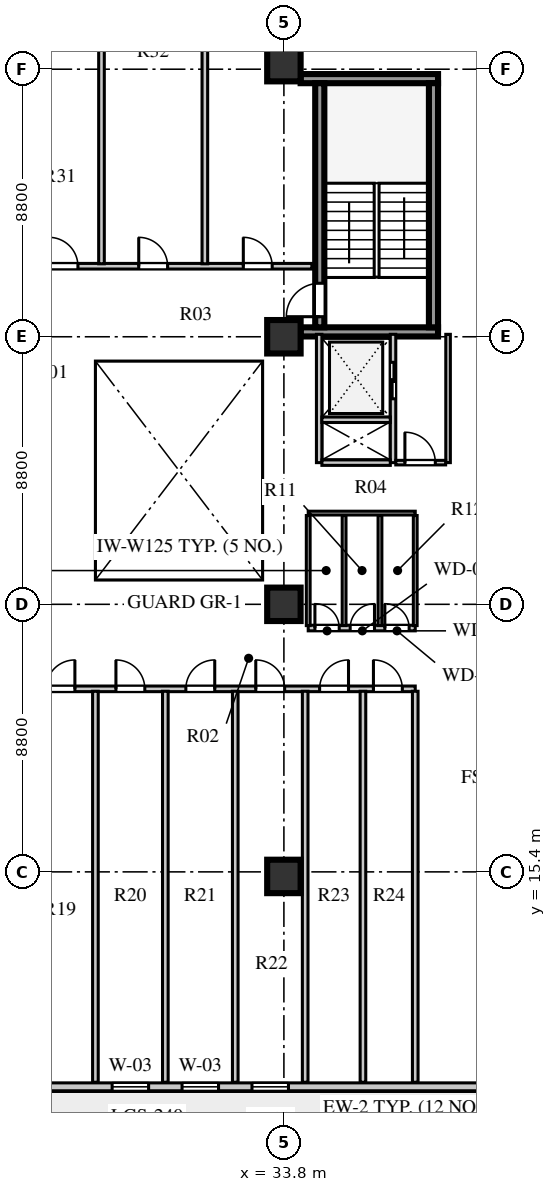
"""IFC4 building model, lengths in metres.
Left out: names, types, materials, properties, quantities, classifications, styles, units other than length and angle.
Written with IfcOpenShell. Run it as: python <this file> out.ifc"""

import sys

from ifc_helpers import new_model, si_unit, direction, frame, frame_2d, origin, origin_2d, place, context, subcontext, project, spatial, rectangle, extrude, element, fill, save


model = new_model("IFC4")
c1 = context("Model", 3, precision=1e-05, world=origin(), true_north=direction((0.0, 1.0)))
c2 = subcontext(c1, "Body", "Model", "MODEL_VIEW")
j1 = project(units=[si_unit("LENGTHUNIT", "METRE"), si_unit("PLANEANGLEUNIT", "RADIAN")], contexts=[c1])
p1 = place(None, origin())
s1 = spatial("IfcSite", under=j1, at=p1, CompositionType="ELEMENT")
p2 = place(p1, origin())
s2 = spatial("IfcBuilding", under=s1, at=p2, CompositionType="ELEMENT")
p3 = place(p2, frame((0.0, 0.0, 82.0)))
s3 = spatial("IfcBuildingStorey", under=s2, at=p3, CompositionType="ELEMENT", Elevation=82.0)
for number, where, z_axis, x_axis in (
    (1, (34.35, 33.16, 0.0), (0.0, 0.0, 1.0), (1.0, 0.0, 0.0)),
    (2, (34.35, 41.49, 0.0), (0.0, 0.0, 1.0), (1.0, 0.0, 0.0)),
):
    element("IfcWall", number, at=place(p3, frame(where, z_axis=z_axis, x_axis=x_axis)), inside=s3, PredefinedType="SHEAR", context=c2, shape_type="SweptSolid", body=[
        extrude(rectangle(XDim=4.52, YDim=0.3, at=frame_2d((2.26, 0.0))), origin(), (0.0, 0.0, 1.0), 3.74),
    ])
p4 = place(p3, frame((34.98, 33.31, 0.0), z_axis=(0.0, 0.0, 1.0), x_axis=(0.0, 1.0, 0.0)))
e3 = element("IfcWall", 3, at=p4, inside=s3, PredefinedType="SHEAR", context=c2, shape_type="SweptSolid", body=[
    extrude(rectangle(XDim=8.03, YDim=0.3, at=frame_2d((4.015, 0.0))), origin(), (0.0, 0.0, 1.0), 3.74),
])
p5 = place(p4, frame((0.35, 0.0, 0.0)))
e4 = element("IfcOpeningElement", 4, at=p5, cuts=e3, PredefinedType="OPENING", context=c2, shape_type="SweptSolid", body=[
    extrude(rectangle(XDim=1.1, YDim=2.1, at=frame_2d((0.55, 1.05))), frame((0.0, 0.16, 0.0), z_axis=(0.0, -1.0, 0.0), x_axis=(1.0, 0.0, 0.0)), (0.0, 0.0, 1.0), 0.32),
])
p6 = place(p3, frame((38.72, 33.31, 0.0), z_axis=(0.0, 0.0, 1.0), x_axis=(0.0, 1.0, 0.0)))
e5 = element("IfcWall", 5, at=p6, inside=s3, PredefinedType="SHEAR", context=c2, shape_type="SweptSolid", body=[
    extrude(rectangle(XDim=8.03, YDim=0.3, at=frame_2d((4.015, 0.0))), origin(), (0.0, 0.0, 1.0), 3.74),
])
for number, where, z_axis, x_axis in (
    (6, (33.8, 15.25, 0.0), (0.0, 0.0, 1.0), (1.0, 0.0, 0.0)),
    (7, (33.8, 24.2, 0.0), (0.0, 0.0, 1.0), (1.0, 0.0, 0.0)),
    (8, (33.8, 33.0, 0.0), (0.0, 0.0, 1.0), (1.0, 0.0, 0.0)),
    (9, (33.8, 41.95, 0.0), (0.0, 0.0, 1.0), (1.0, 0.0, 0.0)),
):
    element("IfcColumn", number, at=place(p3, frame(where, z_axis=z_axis, x_axis=x_axis)), inside=s3, PredefinedType="COLUMN", context=c2, shape_type="SweptSolid", body=[
        extrude(rectangle(XDim=1.1, YDim=1.1, at=origin_2d()), origin(), (0.0, 0.0, 1.0), 3.74),
    ])
p7 = place(p3, frame((12.0, 8.33, 0.0), z_axis=(0.0, 0.0, 1.0), x_axis=(1.0, 0.0, 0.0)))
e10 = element("IfcWall", 10, at=p7, inside=s3, PredefinedType="SOLIDWALL", context=c2, shape_type="SweptSolid", body=[
    extrude(rectangle(XDim=34.6, YDim=0.26, at=frame_2d((17.3, 0.0))), origin(), (0.0, 0.0, 1.0), 3.74),
])
p8 = place(p7, frame((0.95, 0.0, 0.0)))
e11 = element("IfcOpeningElement", 11, at=p8, cuts=e10, PredefinedType="OPENING", context=c2, shape_type="SweptSolid", body=[
    extrude(rectangle(XDim=1.0, YDim=2.05, at=frame_2d((0.5, 1.025))), frame((0.0, 0.14, 0.0), z_axis=(0.0, -1.0, 0.0), x_axis=(1.0, 0.0, 0.0)), (0.0, 0.0, 1.0), 0.28),
])
p9 = place(p7, frame((7.88, 0.0, 0.8)))
e12 = element("IfcOpeningElement", 12, at=p9, cuts=e10, PredefinedType="OPENING", context=c2, shape_type="SweptSolid", body=[
    extrude(rectangle(XDim=1.5, YDim=2.0, at=frame_2d((0.75, 1.0))), frame((0.0, 0.14, 0.0), z_axis=(0.0, -1.0, 0.0), x_axis=(1.0, 0.0, 0.0)), (0.0, 0.0, 1.0), 0.28),
])
p10 = place(p7, frame((16.15, 0.0, 0.8)))
e13 = element("IfcOpeningElement", 13, at=p10, cuts=e10, PredefinedType="OPENING", context=c2, shape_type="SweptSolid", body=[
    extrude(rectangle(XDim=1.2, YDim=1.75, at=frame_2d((0.6, 0.875))), frame((0.0, 0.14, 0.0), z_axis=(0.0, -1.0, 0.0), x_axis=(1.0, 0.0, 0.0)), (0.0, 0.0, 1.0), 0.28),
])
p11 = place(p7, frame((18.45, 0.0, 0.8)))
e14 = element("IfcOpeningElement", 14, at=p11, cuts=e10, PredefinedType="OPENING", context=c2, shape_type="SweptSolid", body=[
    extrude(rectangle(XDim=1.2, YDim=1.75, at=frame_2d((0.6, 0.875))), frame((0.0, 0.14, 0.0), z_axis=(0.0, -1.0, 0.0), x_axis=(1.0, 0.0, 0.0)), (0.0, 0.0, 1.0), 0.28),
])
p12 = place(p7, frame((20.75, 0.0, 0.8)))
e15 = element("IfcOpeningElement", 15, at=p12, cuts=e10, PredefinedType="OPENING", context=c2, shape_type="SweptSolid", body=[
    extrude(rectangle(XDim=1.2, YDim=1.75, at=frame_2d((0.6, 0.875))), frame((0.0, 0.14, 0.0), z_axis=(0.0, -1.0, 0.0), x_axis=(1.0, 0.0, 0.0)), (0.0, 0.0, 1.0), 0.28),
])
p13 = place(p7, frame((29.63, 0.0, 0.8)))
e16 = element("IfcOpeningElement", 16, at=p13, cuts=e10, PredefinedType="OPENING", context=c2, shape_type="SweptSolid", body=[
    extrude(rectangle(XDim=1.35, YDim=1.9, at=frame_2d((0.675, 0.95))), frame((0.0, 0.14, 0.0), z_axis=(0.0, -1.0, 0.0), x_axis=(1.0, 0.0, 0.0)), (0.0, 0.0, 1.0), 0.28),
])
p14 = place(p3, frame((34.96, 28.86, 0.0), z_axis=(0.0, 0.0, 1.0), x_axis=(0.0, 1.0, 0.0)))
e17 = element("IfcWall", 17, at=p14, inside=s3, PredefinedType="SOLIDWALL", context=c2, shape_type="SweptSolid", body=[
    extrude(rectangle(XDim=4.22, YDim=0.18, at=frame_2d((2.11, 0.0))), origin(), (0.0, 0.0, 1.0), 3.74),
])
p15 = place(p3, frame((37.39, 28.86, 0.0), z_axis=(0.0, 0.0, 1.0), x_axis=(0.0, 1.0, 0.0)))
e18 = element("IfcWall", 18, at=p15, inside=s3, PredefinedType="SOLIDWALL", context=c2, shape_type="SweptSolid", body=[
    extrude(rectangle(XDim=4.22, YDim=0.18, at=frame_2d((2.11, 0.0))), origin(), (0.0, 0.0, 1.0), 3.74),
])
p16 = place(p15, frame((2.1, 0.0, 0.0)))
e19 = element("IfcOpeningElement", 19, at=p16, cuts=e18, PredefinedType="OPENING", context=c2, shape_type="SweptSolid", body=[
    extrude(rectangle(XDim=1.2, YDim=2.12, at=frame_2d((0.6, 1.06))), frame((0.0, 0.1, 0.0), z_axis=(0.0, -1.0, 0.0), x_axis=(1.0, 0.0, 0.0)), (0.0, 0.0, 1.0), 0.2),
])
for number, where, z_axis, x_axis in (
    (20, (35.05, 28.86, 0.0), (0.0, 0.0, 1.0), (1.0, 0.0, 0.0)),
    (21, (35.05, 30.27, 0.0), (0.0, 0.0, 1.0), (1.0, 0.0, 0.0)),
):
    element("IfcWall", number, at=place(p3, frame(where, z_axis=z_axis, x_axis=x_axis)), inside=s3, PredefinedType="SOLIDWALL", context=c2, shape_type="SweptSolid", body=[
        extrude(rectangle(XDim=2.25, YDim=0.18, at=frame_2d((1.125, 0.0))), origin(), (0.0, 0.0, 1.0), 3.74),
    ])
p17 = place(p3, frame((39.2, 28.86, 0.0), z_axis=(0.0, 0.0, 1.0), x_axis=(0.0, 1.0, 0.0)))
e22 = element("IfcWall", 22, at=p17, inside=s3, PredefinedType="PARTITIONING", context=c2, shape_type="SweptSolid", body=[
    extrude(rectangle(XDim=4.22, YDim=0.15, at=frame_2d((2.11, 0.0))), origin(), (0.0, 0.0, 1.0), 3.74),
])
p18 = place(p3, frame((37.48, 28.86, 0.0), z_axis=(0.0, 0.0, 1.0), x_axis=(1.0, 0.0, 0.0)))
e23 = element("IfcWall", 23, at=p18, inside=s3, PredefinedType="PARTITIONING", context=c2, shape_type="SweptSolid", body=[
    extrude(rectangle(XDim=1.64, YDim=0.15, at=frame_2d((0.82, 0.0))), origin(), (0.0, 0.0, 1.0), 3.74),
])
p19 = place(p18, frame((0.3, 0.0, 0.0)))
e24 = element("IfcOpeningElement", 24, at=p19, cuts=e23, PredefinedType="OPENING", context=c2, shape_type="SweptSolid", body=[
    extrude(rectangle(XDim=1.0, YDim=2.1, at=frame_2d((0.5, 1.05))), frame((0.0, 0.085, 0.0), z_axis=(0.0, -1.0, 0.0), x_axis=(1.0, 0.0, 0.0)), (0.0, 0.0, 1.0), 0.17),
])
p20 = place(p3, frame((25.25, 21.42, 0.0), z_axis=(0.0, 0.0, 1.0), x_axis=(1.0, 0.0, 0.0)))
e25 = element("IfcWall", 25, at=p20, inside=s3, PredefinedType="SOLIDWALL", context=c2, shape_type="SweptSolid", body=[
    extrude(rectangle(XDim=12.87, YDim=0.185, at=frame_2d((6.435, 0.0))), origin(), (0.0, 0.0, 1.0), 3.34),
])
p21 = place(p20, frame((0.725, 0.0, 0.0)))
e26 = element("IfcOpeningElement", 26, at=p21, cuts=e25, PredefinedType="OPENING", context=c2, shape_type="SweptSolid", body=[
    extrude(rectangle(XDim=0.95, YDim=2.08, at=frame_2d((0.475, 1.04))), frame((0.0, 0.103, 0.0), z_axis=(0.0, -1.0, 0.0), x_axis=(1.0, 0.0, 0.0)), (0.0, 0.0, 1.0), 0.205),
])
p22 = place(p20, frame((3.025, 0.0, 0.0)))
e27 = element("IfcOpeningElement", 27, at=p22, cuts=e25, PredefinedType="OPENING", context=c2, shape_type="SweptSolid", body=[
    extrude(rectangle(XDim=0.95, YDim=2.08, at=frame_2d((0.475, 1.04))), frame((0.0, 0.103, 0.0), z_axis=(0.0, -1.0, 0.0), x_axis=(1.0, 0.0, 0.0)), (0.0, 0.0, 1.0), 0.205),
])
p23 = place(p20, frame((5.325, 0.0, 0.0)))
e28 = element("IfcOpeningElement", 28, at=p23, cuts=e25, PredefinedType="OPENING", context=c2, shape_type="SweptSolid", body=[
    extrude(rectangle(XDim=0.95, YDim=2.08, at=frame_2d((0.475, 1.04))), frame((0.0, 0.103, 0.0), z_axis=(0.0, -1.0, 0.0), x_axis=(1.0, 0.0, 0.0)), (0.0, 0.0, 1.0), 0.205),
])
p24 = place(p20, frame((7.625, 0.0, 0.0)))
e29 = element("IfcOpeningElement", 29, at=p24, cuts=e25, PredefinedType="OPENING", context=c2, shape_type="SweptSolid", body=[
    extrude(rectangle(XDim=0.95, YDim=2.08, at=frame_2d((0.475, 1.04))), frame((0.0, 0.103, 0.0), z_axis=(0.0, -1.0, 0.0), x_axis=(1.0, 0.0, 0.0)), (0.0, 0.0, 1.0), 0.205),
])
p25 = place(p20, frame((9.725, 0.0, 0.0)))
e30 = element("IfcOpeningElement", 30, at=p25, cuts=e25, PredefinedType="OPENING", context=c2, shape_type="SweptSolid", body=[
    extrude(rectangle(XDim=0.95, YDim=2.08, at=frame_2d((0.475, 1.04))), frame((0.0, 0.103, 0.0), z_axis=(0.0, -1.0, 0.0), x_axis=(1.0, 0.0, 0.0)), (0.0, 0.0, 1.0), 0.205),
])
p26 = place(p20, frame((11.495, 0.0, 0.0)))
e31 = element("IfcOpeningElement", 31, at=p26, cuts=e25, PredefinedType="OPENING", context=c2, shape_type="SweptSolid", body=[
    extrude(rectangle(XDim=0.95, YDim=2.08, at=frame_2d((0.475, 1.04))), frame((0.0, 0.103, 0.0), z_axis=(0.0, -1.0, 0.0), x_axis=(1.0, 0.0, 0.0)), (0.0, 0.0, 1.0), 0.205),
])
p27 = place(p3, frame((38.12, 8.48, 0.0), z_axis=(0.0, 0.0, 1.0), x_axis=(0.0, 1.0, 0.0)))
e32 = element("IfcWall", 32, at=p27, inside=s3, PredefinedType="SOLIDWALL", context=c2, shape_type="SweptSolid", body=[
    extrude(rectangle(XDim=12.86, YDim=0.185, at=frame_2d((6.43, 0.0))), origin(), (0.0, 0.0, 1.0), 3.74),
])
p28 = place(p3, frame((34.6, 23.42, 0.0), z_axis=(0.0, 0.0, 1.0), x_axis=(1.0, 0.0, 0.0)))
e33 = element("IfcWall", 33, at=p28, inside=s3, PredefinedType="SOLIDWALL", context=c2, shape_type="SweptSolid", body=[
    extrude(rectangle(XDim=3.52, YDim=0.185, at=frame_2d((1.76, 0.0))), origin(), (0.0, 0.0, 1.0), 3.74),
])
p29 = place(p28, frame((0.22, 0.0, 0.0)))
e34 = element("IfcOpeningElement", 34, at=p29, cuts=e33, PredefinedType="OPENING", context=c2, shape_type="SweptSolid", body=[
    extrude(rectangle(XDim=0.8, YDim=2.05, at=frame_2d((0.4, 1.025))), frame((0.0, 0.103, 0.0), z_axis=(0.0, -1.0, 0.0), x_axis=(1.0, 0.0, 0.0)), (0.0, 0.0, 1.0), 0.205),
])
p30 = place(p28, frame((1.38, 0.0, 0.0)))
e35 = element("IfcOpeningElement", 35, at=p30, cuts=e33, PredefinedType="OPENING", context=c2, shape_type="SweptSolid", body=[
    extrude(rectangle(XDim=0.8, YDim=2.05, at=frame_2d((0.4, 1.025))), frame((0.0, 0.103, 0.0), z_axis=(0.0, -1.0, 0.0), x_axis=(1.0, 0.0, 0.0)), (0.0, 0.0, 1.0), 0.205),
])
p31 = place(p28, frame((2.52, 0.0, 0.0)))
e36 = element("IfcOpeningElement", 36, at=p31, cuts=e33, PredefinedType="OPENING", context=c2, shape_type="SweptSolid", body=[
    extrude(rectangle(XDim=0.8, YDim=2.05, at=frame_2d((0.4, 1.025))), frame((0.0, 0.103, 0.0), z_axis=(0.0, -1.0, 0.0), x_axis=(1.0, 0.0, 0.0)), (0.0, 0.0, 1.0), 0.205),
])
p32 = place(p3, frame((25.25, 35.32, 0.0), z_axis=(0.0, 0.0, 1.0), x_axis=(1.0, 0.0, 0.0)))
e37 = element("IfcWall", 37, at=p32, inside=s3, PredefinedType="SOLIDWALL", context=c2, shape_type="SweptSolid", body=[
    extrude(rectangle(XDim=9.47, YDim=0.185, at=frame_2d((4.735, 0.0))), origin(), (0.0, 0.0, 1.0), 3.74),
])
p33 = place(p32, frame((0.825, 0.0, 0.0)))
e38 = element("IfcOpeningElement", 38, at=p33, cuts=e37, PredefinedType="OPENING", context=c2, shape_type="SweptSolid", body=[
    extrude(rectangle(XDim=0.95, YDim=2.08, at=frame_2d((0.475, 1.04))), frame((0.0, 0.103, 0.0), z_axis=(0.0, -1.0, 0.0), x_axis=(1.0, 0.0, 0.0)), (0.0, 0.0, 1.0), 0.205),
])
p34 = place(p32, frame((3.775, 0.0, 0.0)))
e39 = element("IfcOpeningElement", 39, at=p34, cuts=e37, PredefinedType="OPENING", context=c2, shape_type="SweptSolid", body=[
    extrude(rectangle(XDim=0.95, YDim=2.08, at=frame_2d((0.475, 1.04))), frame((0.0, 0.103, 0.0), z_axis=(0.0, -1.0, 0.0), x_axis=(1.0, 0.0, 0.0)), (0.0, 0.0, 1.0), 0.205),
])
p35 = place(p32, frame((7.215, 0.0, 0.0)))
e40 = element("IfcOpeningElement", 40, at=p35, cuts=e37, PredefinedType="OPENING", context=c2, shape_type="SweptSolid", body=[
    extrude(rectangle(XDim=0.95, YDim=2.08, at=frame_2d((0.475, 1.04))), frame((0.0, 0.103, 0.0), z_axis=(0.0, -1.0, 0.0), x_axis=(1.0, 0.0, 0.0)), (0.0, 0.0, 1.0), 0.205),
])
p36 = place(p3, frame((34.6, 27.2, 0.0), z_axis=(0.0, 0.0, 1.0), x_axis=(1.0, 0.0, 0.0)))
e41 = element("IfcWall", 41, at=p36, inside=s3, PredefinedType="PLUMBINGWALL", context=c2, shape_type="SweptSolid", body=[
    extrude(rectangle(XDim=3.52, YDim=0.125, at=frame_2d((1.76, 0.0))), origin(), (0.0, 0.0, 1.0), 3.34),
])
for number, where, z_axis, x_axis in (
    (42, (34.6, 23.5, 0.0), (0.0, 0.0, 1.0), (0.0, 1.0, 0.0)),
    (43, (38.12, 23.5, 0.0), (0.0, 0.0, 1.0), (0.0, 1.0, 0.0)),
    (44, (35.78, 23.5, 0.0), (0.0, 0.0, 1.0), (0.0, 1.0, 0.0)),
    (45, (36.96, 23.5, 0.0), (0.0, 0.0, 1.0), (0.0, 1.0, 0.0)),
):
    element("IfcWall", number, at=place(p3, frame(where, z_axis=z_axis, x_axis=x_axis)), inside=s3, PredefinedType="PLUMBINGWALL", context=c2, shape_type="SweptSolid", body=[
        extrude(rectangle(XDim=3.62, YDim=0.125, at=frame_2d((1.81, 0.0))), origin(), (0.0, 0.0, 1.0), 3.74),
    ])
for number, where, z_axis, x_axis in (
    (46, (27.6, 8.48, 0.0), (0.0, 0.0, 1.0), (0.0, 1.0, 0.0)),
    (47, (29.9, 8.48, 0.0), (0.0, 0.0, 1.0), (0.0, 1.0, 0.0)),
    (48, (32.2, 8.48, 0.0), (0.0, 0.0, 1.0), (0.0, 1.0, 0.0)),
    (49, (34.5, 8.48, 0.0), (0.0, 0.0, 1.0), (0.0, 1.0, 0.0)),
    (50, (36.4, 8.48, 0.0), (0.0, 0.0, 1.0), (0.0, 1.0, 0.0)),
):
    element("IfcWall", number, at=place(p3, frame(where, z_axis=z_axis, x_axis=x_axis)), inside=s3, PredefinedType="SOLIDWALL", context=c2, shape_type="SweptSolid", body=[
        extrude(rectangle(XDim=12.86, YDim=0.185, at=frame_2d((6.43, 0.0))), origin(), (0.0, 0.0, 1.0), 3.74),
    ])
for number, where, z_axis, x_axis in (
    (51, (27.8, 35.4, 0.0), (0.0, 0.0, 1.0), (0.0, 1.0, 0.0)),
    (52, (31.2, 35.4, 0.0), (0.0, 0.0, 1.0), (0.0, 1.0, 0.0)),
):
    element("IfcWall", number, at=place(p3, frame(where, z_axis=z_axis, x_axis=x_axis)), inside=s3, PredefinedType="SOLIDWALL", context=c2, shape_type="SweptSolid", body=[
        extrude(rectangle(XDim=13.32, YDim=0.185, at=frame_2d((6.66, 0.0))), origin(), (0.0, 0.0, 1.0), 3.74),
    ])
p37 = place(p10, origin())
e53 = element("IfcWindow", 53, at=p37, inside=s3, PartitioningType="SINGLE_PANEL", PredefinedType="WINDOW", context=c2, shape_type="SweptSolid", body=[
    extrude(rectangle(XDim=1.2, YDim=1.75, at=frame_2d((0.6, 0.875))), frame((0.0, 0.03, 0.0), z_axis=(0.0, -1.0, 0.0), x_axis=(1.0, 0.0, 0.0)), (0.0, 0.0, 1.0), 0.06),
])
fill(e13, e53)
p38 = place(p11, origin())
e54 = element("IfcWindow", 54, at=p38, inside=s3, PartitioningType="SINGLE_PANEL", PredefinedType="WINDOW", context=c2, shape_type="SweptSolid", body=[
    extrude(rectangle(XDim=1.2, YDim=1.75, at=frame_2d((0.6, 0.875))), frame((0.0, 0.03, 0.0), z_axis=(0.0, -1.0, 0.0), x_axis=(1.0, 0.0, 0.0)), (0.0, 0.0, 1.0), 0.06),
])
fill(e14, e54)
p39 = place(p12, origin())
e55 = element("IfcWindow", 55, at=p39, inside=s3, PartitioningType="SINGLE_PANEL", PredefinedType="WINDOW", context=c2, shape_type="SweptSolid", body=[
    extrude(rectangle(XDim=1.2, YDim=1.75, at=frame_2d((0.6, 0.875))), frame((0.0, 0.03, 0.0), z_axis=(0.0, -1.0, 0.0), x_axis=(1.0, 0.0, 0.0)), (0.0, 0.0, 1.0), 0.06),
])
fill(e15, e55)
p40 = place(p5, origin())
e56 = element("IfcDoor", 56, at=p40, inside=s3, OperationType="SINGLE_SWING_LEFT", PredefinedType="DOOR", context=c2, shape_type="SweptSolid", body=[
    extrude(rectangle(XDim=1.1, YDim=2.1, at=frame_2d((0.55, 1.05))), frame((0.0, 0.025, 0.0), z_axis=(0.0, -1.0, 0.0), x_axis=(1.0, 0.0, 0.0)), (0.0, 0.0, 1.0), 0.05),
])
fill(e4, e56)
p41 = place(p16, frame((1.2, 0.0, 0.0), z_axis=(0.0, 0.0, 1.0), x_axis=(-1.0, 0.0, 0.0)))
e57 = element("IfcDoor", 57, at=p41, inside=s3, OperationType="DOUBLE_DOOR_SLIDING", PredefinedType="DOOR", context=c2, shape_type="SweptSolid", body=[
    extrude(rectangle(XDim=1.2, YDim=2.12, at=frame_2d((0.6, 1.06))), frame((0.0, 0.025, 0.0), z_axis=(0.0, -1.0, 0.0), x_axis=(1.0, 0.0, 0.0)), (0.0, 0.0, 1.0), 0.05),
])
fill(e19, e57)
p42 = place(p19, origin())
e58 = element("IfcDoor", 58, at=p42, inside=s3, OperationType="SINGLE_SWING_LEFT", PredefinedType="DOOR", context=c2, shape_type="SweptSolid", body=[
    extrude(rectangle(XDim=1.0, YDim=2.1, at=frame_2d((0.5, 1.05))), frame((0.0, 0.025, 0.0), z_axis=(0.0, -1.0, 0.0), x_axis=(1.0, 0.0, 0.0)), (0.0, 0.0, 1.0), 0.05),
])
fill(e24, e58)
p43 = place(p29, origin())
e59 = element("IfcDoor", 59, at=p43, inside=s3, OperationType="SINGLE_SWING_LEFT", PredefinedType="DOOR", context=c2, shape_type="SweptSolid", body=[
    extrude(rectangle(XDim=0.8, YDim=2.05, at=frame_2d((0.4, 1.025))), frame((0.0, 0.025, 0.0), z_axis=(0.0, -1.0, 0.0), x_axis=(1.0, 0.0, 0.0)), (0.0, 0.0, 1.0), 0.05),
])
fill(e34, e59)
p44 = place(p30, origin())
e60 = element("IfcDoor", 60, at=p44, inside=s3, OperationType="SINGLE_SWING_RIGHT", PredefinedType="DOOR", context=c2, shape_type="SweptSolid", body=[
    extrude(rectangle(XDim=0.8, YDim=2.05, at=frame_2d((0.4, 1.025))), frame((0.0, 0.025, 0.0), z_axis=(0.0, -1.0, 0.0), x_axis=(1.0, 0.0, 0.0)), (0.0, 0.0, 1.0), 0.05),
])
fill(e35, e60)
p45 = place(p31, origin())
e61 = element("IfcDoor", 61, at=p45, inside=s3, OperationType="SINGLE_SWING_LEFT", PredefinedType="DOOR", context=c2, shape_type="SweptSolid", body=[
    extrude(rectangle(XDim=0.8, YDim=2.05, at=frame_2d((0.4, 1.025))), frame((0.0, 0.025, 0.0), z_axis=(0.0, -1.0, 0.0), x_axis=(1.0, 0.0, 0.0)), (0.0, 0.0, 1.0), 0.05),
])
fill(e36, e61)
p46 = place(p21, frame((0.95, 0.0, 0.0), z_axis=(0.0, 0.0, 1.0), x_axis=(-1.0, 0.0, 0.0)))
e62 = element("IfcDoor", 62, at=p46, inside=s3, OperationType="SINGLE_SWING_LEFT", PredefinedType="DOOR", context=c2, shape_type="SweptSolid", body=[
    extrude(rectangle(XDim=0.95, YDim=2.08, at=frame_2d((0.475, 1.04))), frame((0.0, 0.025, 0.0), z_axis=(0.0, -1.0, 0.0), x_axis=(1.0, 0.0, 0.0)), (0.0, 0.0, 1.0), 0.05),
])
fill(e26, e62)
p47 = place(p22, frame((0.95, 0.0, 0.0), z_axis=(0.0, 0.0, 1.0), x_axis=(-1.0, 0.0, 0.0)))
e63 = element("IfcDoor", 63, at=p47, inside=s3, OperationType="SINGLE_SWING_RIGHT", PredefinedType="DOOR", context=c2, shape_type="SweptSolid", body=[
    extrude(rectangle(XDim=0.95, YDim=2.08, at=frame_2d((0.475, 1.04))), frame((0.0, 0.025, 0.0), z_axis=(0.0, -1.0, 0.0), x_axis=(1.0, 0.0, 0.0)), (0.0, 0.0, 1.0), 0.05),
])
fill(e27, e63)
p48 = place(p23, frame((0.95, 0.0, 0.0), z_axis=(0.0, 0.0, 1.0), x_axis=(-1.0, 0.0, 0.0)))
e64 = element("IfcDoor", 64, at=p48, inside=s3, OperationType="SINGLE_SWING_LEFT", PredefinedType="DOOR", context=c2, shape_type="SweptSolid", body=[
    extrude(rectangle(XDim=0.95, YDim=2.08, at=frame_2d((0.475, 1.04))), frame((0.0, 0.025, 0.0), z_axis=(0.0, -1.0, 0.0), x_axis=(1.0, 0.0, 0.0)), (0.0, 0.0, 1.0), 0.05),
])
fill(e28, e64)
p49 = place(p24, frame((0.95, 0.0, 0.0), z_axis=(0.0, 0.0, 1.0), x_axis=(-1.0, 0.0, 0.0)))
e65 = element("IfcDoor", 65, at=p49, inside=s3, OperationType="SINGLE_SWING_RIGHT", PredefinedType="DOOR", context=c2, shape_type="SweptSolid", body=[
    extrude(rectangle(XDim=0.95, YDim=2.08, at=frame_2d((0.475, 1.04))), frame((0.0, 0.025, 0.0), z_axis=(0.0, -1.0, 0.0), x_axis=(1.0, 0.0, 0.0)), (0.0, 0.0, 1.0), 0.05),
])
fill(e29, e65)
p50 = place(p25, frame((0.95, 0.0, 0.0), z_axis=(0.0, 0.0, 1.0), x_axis=(-1.0, 0.0, 0.0)))
e66 = element("IfcDoor", 66, at=p50, inside=s3, OperationType="SINGLE_SWING_LEFT", PredefinedType="DOOR", context=c2, shape_type="SweptSolid", body=[
    extrude(rectangle(XDim=0.95, YDim=2.08, at=frame_2d((0.475, 1.04))), frame((0.0, 0.025, 0.0), z_axis=(0.0, -1.0, 0.0), x_axis=(1.0, 0.0, 0.0)), (0.0, 0.0, 1.0), 0.05),
])
fill(e30, e66)
p51 = place(p26, frame((0.95, 0.0, 0.0), z_axis=(0.0, 0.0, 1.0), x_axis=(-1.0, 0.0, 0.0)))
e67 = element("IfcDoor", 67, at=p51, inside=s3, OperationType="SINGLE_SWING_RIGHT", PredefinedType="DOOR", context=c2, shape_type="SweptSolid", body=[
    extrude(rectangle(XDim=0.95, YDim=2.08, at=frame_2d((0.475, 1.04))), frame((0.0, 0.025, 0.0), z_axis=(0.0, -1.0, 0.0), x_axis=(1.0, 0.0, 0.0)), (0.0, 0.0, 1.0), 0.05),
])
fill(e31, e67)
p52 = place(p33, origin())
e68 = element("IfcDoor", 68, at=p52, inside=s3, OperationType="SINGLE_SWING_LEFT", PredefinedType="DOOR", context=c2, shape_type="SweptSolid", body=[
    extrude(rectangle(XDim=0.95, YDim=2.08, at=frame_2d((0.475, 1.04))), frame((0.0, 0.025, 0.0), z_axis=(0.0, -1.0, 0.0), x_axis=(1.0, 0.0, 0.0)), (0.0, 0.0, 1.0), 0.05),
])
fill(e38, e68)
p53 = place(p34, origin())
e69 = element("IfcDoor", 69, at=p53, inside=s3, OperationType="SINGLE_SWING_LEFT", PredefinedType="DOOR", context=c2, shape_type="SweptSolid", body=[
    extrude(rectangle(XDim=0.95, YDim=2.08, at=frame_2d((0.475, 1.04))), frame((0.0, 0.025, 0.0), z_axis=(0.0, -1.0, 0.0), x_axis=(1.0, 0.0, 0.0)), (0.0, 0.0, 1.0), 0.05),
])
fill(e39, e69)
p54 = place(p35, origin())
e70 = element("IfcDoor", 70, at=p54, inside=s3, OperationType="SINGLE_SWING_LEFT", PredefinedType="DOOR", context=c2, shape_type="SweptSolid", body=[
    extrude(rectangle(XDim=0.95, YDim=2.08, at=frame_2d((0.475, 1.04))), frame((0.0, 0.025, 0.0), z_axis=(0.0, -1.0, 0.0), x_axis=(1.0, 0.0, 0.0)), (0.0, 0.0, 1.0), 0.05),
])
fill(e40, e70)
save(model, sys.argv[1])
